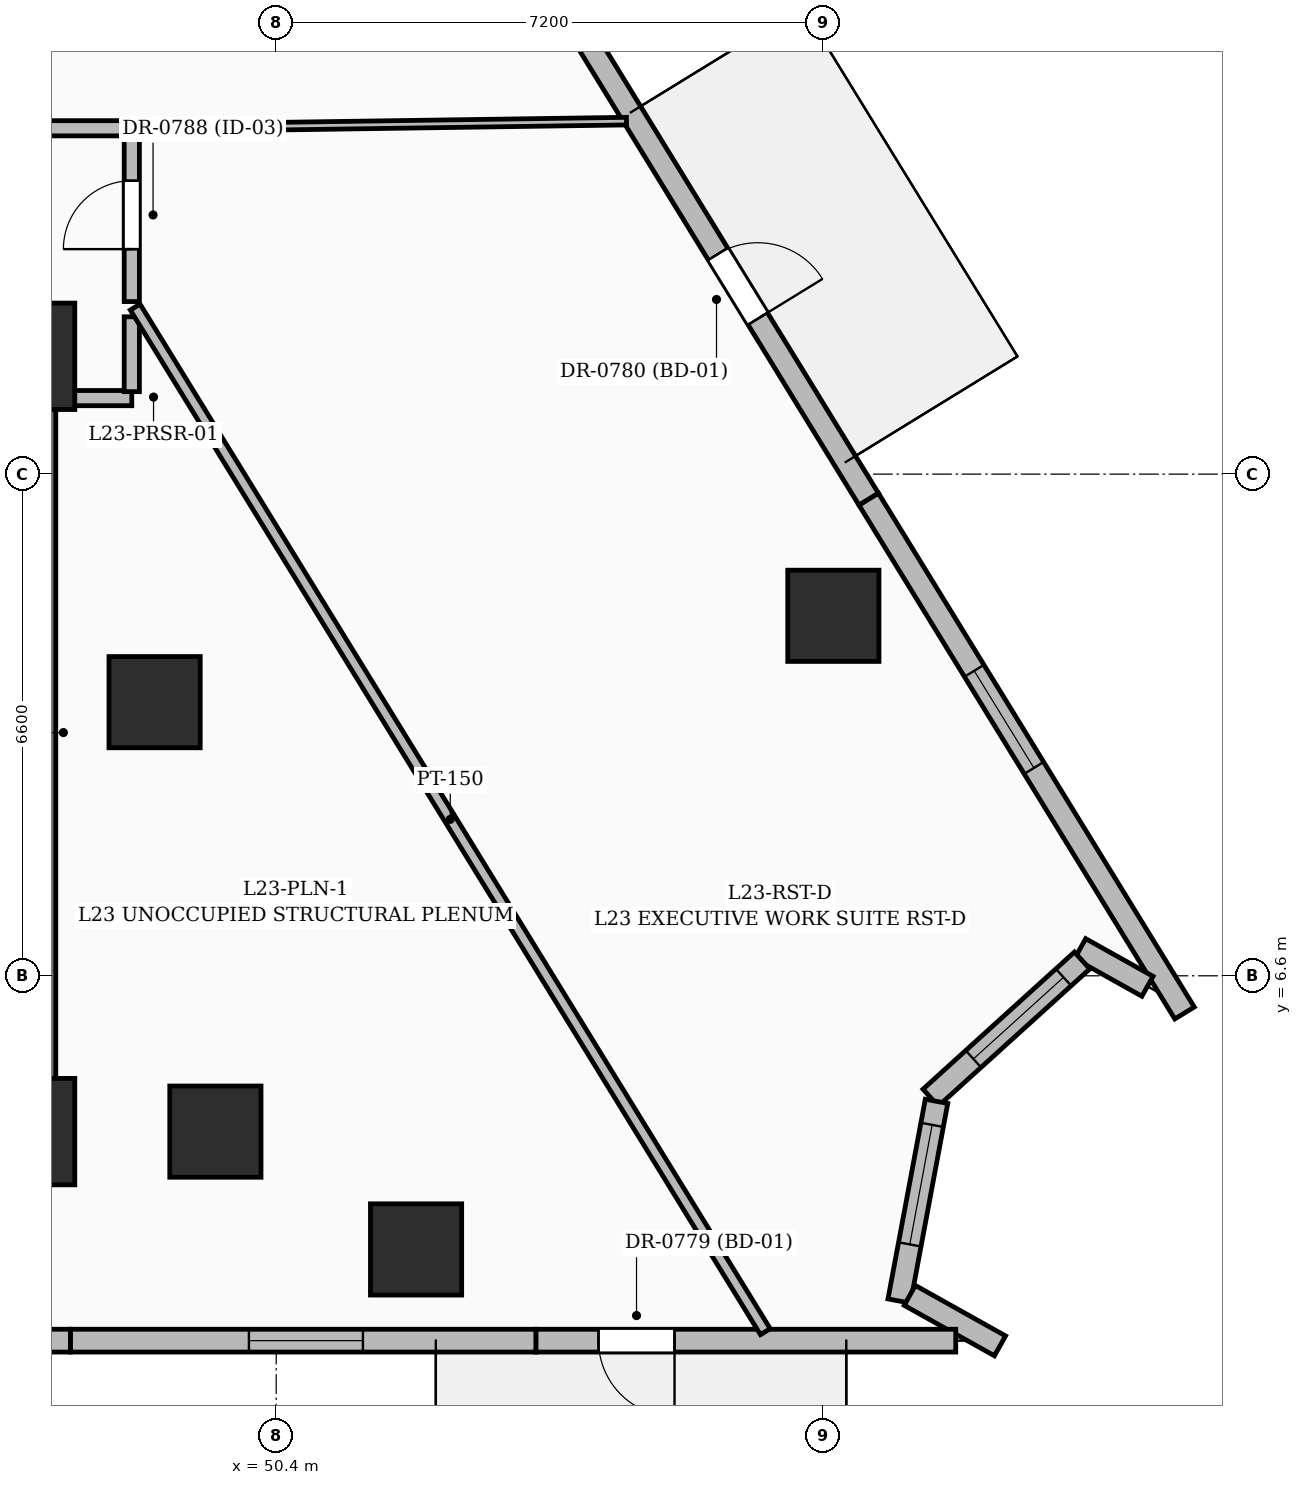
"""IFC4 building model, lengths in metres.
Left out: names, types, materials, properties, quantities, classifications, styles, units other than length and angle.
Written with IfcOpenShell. Run it as: python <this file> out.ifc"""

import sys

from ifc_helpers import new_model, si_unit, direction, frame, frame_2d, origin, origin_2d, place, context, subcontext, project, spatial, rectangle, extrude, element, fill, save


model = new_model("IFC4")
c1 = context("Model", 3, precision=1e-05, world=origin(), true_north=direction((0.0, 1.0)))
c2 = subcontext(c1, "Body", "Model", "MODEL_VIEW")
j1 = project(units=[si_unit("LENGTHUNIT", "METRE"), si_unit("PLANEANGLEUNIT", "RADIAN")], contexts=[c1])
p1 = place(None, origin())
s1 = spatial("IfcSite", under=j1, at=p1, CompositionType="ELEMENT")
p2 = place(p1, origin())
s2 = spatial("IfcBuilding", under=s1, at=p2, CompositionType="ELEMENT")
p3 = place(p2, frame((0.0, 0.0, 93.0)))
s3 = spatial("IfcBuildingStorey", under=s2, at=p3, CompositionType="ELEMENT", Elevation=93.0)
for number, where, z_axis, x_axis in (
    (1, (47.05, 4.55, 0.0), (0.0, 0.0, 1.0), (1.0, 0.0, 0.0)),
    (2, (47.05, 14.75, 0.0), (0.0, 0.0, 1.0), (1.0, 0.0, 0.0)),
):
    element("IfcColumn", number, at=place(p3, frame(where, z_axis=z_axis, x_axis=x_axis)), inside=s3, PredefinedType="COLUMN", context=c2, shape_type="SweptSolid", body=[
        extrude(rectangle(XDim=1.4, YDim=1.4, at=origin_2d()), origin(), (0.0, 0.0, 1.0), 3.6),
    ])
for number, where, z_axis, x_axis in (
    (3, (49.6, 4.55, 0.0), (0.0, 0.0, 1.0), (1.0, 0.0, 0.0)),
    (4, (48.8, 10.2, 0.0), (0.0, 0.0, 1.0), (1.0, 0.0, 0.0)),
):
    element("IfcColumn", number, at=place(p3, frame(where, z_axis=z_axis, x_axis=x_axis)), inside=s3, PredefinedType="COLUMN", context=c2, shape_type="SweptSolid", body=[
        extrude(rectangle(XDim=1.2, YDim=1.2, at=origin_2d()), origin(), (0.0, 0.0, 1.0), 3.6),
    ])
p4 = place(p3, frame((47.05, 5.25, 0.0), z_axis=(0.0, 0.0, 1.0), x_axis=(0.0, 1.0, 0.0)))
e5 = element("IfcWall", 5, at=p4, inside=s3, PredefinedType="SHEAR", context=c2, shape_type="SweptSolid", body=[
    extrude(rectangle(XDim=8.8, YDim=0.9, at=frame_2d((4.4, 0.0))), origin(), (0.0, 0.0, 1.0), 3.6),
])
for number, where, z_axis, x_axis in (
    (6, (52.24, 3.0, 0.0), (0.0, 0.0, 1.0), (1.0, 0.0, 0.0)),
    (7, (57.73, 11.336, 0.0), (0.0, 0.0, 1.0), (1.0, 0.0, 0.0)),
):
    element("IfcColumn", number, at=place(p3, frame(where, z_axis=z_axis, x_axis=x_axis)), inside=s3, PredefinedType="COLUMN", context=c2, shape_type="SweptSolid", body=[
        extrude(rectangle(XDim=1.2, YDim=1.2, at=origin_2d()), origin(), (0.0, 0.0, 1.0), 3.6),
    ])
p5 = place(p3, frame((54.041, 19.629, 0.0), z_axis=(0.0, 0.0, 1.0), x_axis=(0.523661280051, -0.851926560083, 0.0)))
e8 = element("IfcWall", 8, at=p5, inside=s3, PredefinedType="SOLIDWALL", context=c2, shape_type="SweptSolid", body=[
    extrude(rectangle(XDim=7.934, YDim=0.3, at=frame_2d((3.967, 0.0))), origin(), (0.0, 0.0, 1.0), 3.35),
])
p6 = place(p5, frame((4.146, 0.0, 0.0)))
e9 = element("IfcOpeningElement", 9, at=p6, cuts=e8, PredefinedType="OPENING", context=c2, shape_type="SweptSolid", body=[
    extrude(rectangle(XDim=1.0, YDim=2.2, at=frame_2d((0.5, 1.1))), frame((0.0, 0.16, 0.0), z_axis=(0.0, -1.0, 0.0), x_axis=(1.0, 0.0, 0.0)), (0.0, 0.0, 1.0), 0.32),
])
p7 = place(p3, frame((58.195, 12.87, 0.0), z_axis=(0.0, 0.0, 1.0), x_axis=(0.52368361247, -0.851912832413, 0.0)))
e10 = element("IfcWall", 10, at=p7, inside=s3, PredefinedType="SOLIDWALL", context=c2, shape_type="SweptSolid", body=[
    extrude(rectangle(XDim=7.934, YDim=0.3, at=frame_2d((3.967, 0.0))), origin(), (0.0, 0.0, 1.0), 3.35),
])
p8 = place(p7, frame((2.65, 0.0, 0.6)))
e11 = element("IfcOpeningElement", 11, at=p8, cuts=e10, PredefinedType="OPENING", context=c2, shape_type="SweptSolid", body=[
    extrude(rectangle(XDim=1.5, YDim=2.1, at=frame_2d((0.75, 1.05))), frame((0.0, 0.16, 0.0), z_axis=(0.0, -1.0, 0.0), x_axis=(1.0, 0.0, 0.0)), (0.0, 0.0, 1.0), 0.32),
])
p9 = place(p3, frame((61.863, 6.462, 0.0), z_axis=(0.0, 0.0, 1.0), x_axis=(-0.872678236231, 0.488295705499, 0.0)))
e12 = element("IfcWall", 12, at=p9, inside=s3, PredefinedType="SOLIDWALL", context=c2, shape_type="SweptSolid", body=[
    extrude(rectangle(XDim=1.015, YDim=0.3, at=frame_2d((0.507, 0.0))), origin(), (0.0, 0.0, 1.0), 3.35),
])
p10 = place(p3, frame((61.003, 6.802, 0.0), z_axis=(0.0, 0.0, 1.0), x_axis=(-0.741163448221, -0.671324618215, 0.0)))
e13 = element("IfcWall", 13, at=p10, inside=s3, PredefinedType="SOLIDWALL", context=c2, shape_type="SweptSolid", body=[
    extrude(rectangle(XDim=2.688, YDim=0.3, at=frame_2d((1.344, 0.0))), origin(), (0.0, 0.0, 1.0), 3.35),
])
p11 = place(p10, frame((0.33, 0.0, 0.55)))
e14 = element("IfcOpeningElement", 14, at=p11, cuts=e13, PredefinedType="OPENING", context=c2, shape_type="SweptSolid", body=[
    extrude(rectangle(XDim=1.6, YDim=2.2, at=frame_2d((0.8, 1.1))), frame((0.0, 0.16, 0.0), z_axis=(0.0, -1.0, 0.0), x_axis=(1.0, 0.0, 0.0)), (0.0, 0.0, 1.0), 0.32),
])
p12 = place(p3, frame((59.087, 4.948, 0.0), z_axis=(0.0, 0.0, 1.0), x_axis=(-0.183786629236, -0.982966161632, 0.0)))
e15 = element("IfcWall", 15, at=p12, inside=s3, PredefinedType="SOLIDWALL", context=c2, shape_type="SweptSolid", body=[
    extrude(rectangle(XDim=2.673, YDim=0.3, at=frame_2d((1.336, 0.0))), origin(), (0.0, 0.0, 1.0), 3.35),
])
p13 = place(p12, frame((0.315, 0.0, 0.55)))
e16 = element("IfcOpeningElement", 16, at=p13, cuts=e15, PredefinedType="OPENING", context=c2, shape_type="SweptSolid", body=[
    extrude(rectangle(XDim=1.6, YDim=2.2, at=frame_2d((0.8, 1.1))), frame((0.0, 0.16, 0.0), z_axis=(0.0, -1.0, 0.0), x_axis=(1.0, 0.0, 0.0)), (0.0, 0.0, 1.0), 0.32),
])
p14 = place(p3, frame((58.735, 2.396, 0.0), z_axis=(0.0, 0.0, 1.0), x_axis=(0.872747775204, -0.488171405221, 0.0)))
e17 = element("IfcWall", 17, at=p14, inside=s3, PredefinedType="SOLIDWALL", context=c2, shape_type="SweptSolid", body=[
    extrude(rectangle(XDim=1.36, YDim=0.3, at=frame_2d((0.68, 0.0))), origin(), (0.0, 0.0, 1.0), 3.35),
])
p15 = place(p3, frame((59.34, 1.8, 0.0), z_axis=(0.0, 0.0, 1.0), x_axis=(-1.0, 0.0, 0.0)))
e18 = element("IfcWall", 18, at=p15, inside=s3, PredefinedType="SOLIDWALL", context=c2, shape_type="SweptSolid", body=[
    extrude(rectangle(XDim=5.524, YDim=0.3, at=frame_2d((2.762, 0.0))), origin(), (0.0, 0.0, 1.0), 3.35),
])
p16 = place(p15, frame((3.7, 0.0, 0.0)))
e19 = element("IfcOpeningElement", 19, at=p16, cuts=e18, PredefinedType="OPENING", context=c2, shape_type="SweptSolid", body=[
    extrude(rectangle(XDim=1.0, YDim=2.2, at=frame_2d((0.5, 1.1))), frame((0.0, 0.16, 0.0), z_axis=(0.0, -1.0, 0.0), x_axis=(1.0, 0.0, 0.0)), (0.0, 0.0, 1.0), 0.32),
])
p17 = place(p3, frame((53.816, 1.8, 0.0), z_axis=(0.0, 0.0, 1.0), x_axis=(-1.0, 0.0, 0.0)))
e20 = element("IfcWall", 20, at=p17, inside=s3, PredefinedType="SOLIDWALL", context=c2, shape_type="SweptSolid", body=[
    extrude(rectangle(XDim=6.124, YDim=0.3, at=frame_2d((3.062, 0.0))), origin(), (0.0, 0.0, 1.0), 3.35),
])
p18 = place(p17, frame((2.275, 0.0, 0.6)))
e21 = element("IfcOpeningElement", 21, at=p18, cuts=e20, PredefinedType="OPENING", context=c2, shape_type="SweptSolid", body=[
    extrude(rectangle(XDim=1.5, YDim=2.1, at=frame_2d((0.75, 1.05))), frame((0.0, 0.16, 0.0), z_axis=(0.0, -1.0, 0.0), x_axis=(1.0, 0.0, 0.0)), (0.0, 0.0, 1.0), 0.32),
])
p19 = place(p3, frame((47.692, 1.8, 0.0), z_axis=(0.0, 0.0, 1.0), x_axis=(-1.0, 0.0, 0.0)))
e22 = element("IfcWall", 22, at=p19, inside=s3, PredefinedType="SOLIDWALL", context=c2, shape_type="SweptSolid", body=[
    extrude(rectangle(XDim=6.124, YDim=0.3, at=frame_2d((3.062, 0.0))), origin(), (0.0, 0.0, 1.0), 3.35),
])
p20 = place(p19, frame((2.425, 0.0, 0.8)))
e23 = element("IfcOpeningElement", 23, at=p20, cuts=e22, PredefinedType="OPENING", context=c2, shape_type="SweptSolid", body=[
    extrude(rectangle(XDim=1.2, YDim=1.8, at=frame_2d((0.6, 0.9))), frame((0.0, 0.16, 0.0), z_axis=(0.0, -1.0, 0.0), x_axis=(1.0, 0.0, 0.0)), (0.0, 0.0, 1.0), 0.32),
])
p21 = place(p3, frame((47.5, 14.2, 0.0), z_axis=(0.0, 0.0, 1.0), x_axis=(1.0, 0.0, 0.0)))
e24 = element("IfcWall", 24, at=p21, inside=s3, PredefinedType="PARTITIONING", context=c2, shape_type="SweptSolid", body=[
    extrude(rectangle(XDim=1.0, YDim=0.2, at=frame_2d((0.5, 0.0))), origin(), (0.0, 0.0, 1.0), 3.35),
])
p22 = place(p3, frame((48.5, 14.285, 0.0), z_axis=(0.0, 0.0, 1.0), x_axis=(0.0, 1.0, 0.0)))
e25 = element("IfcWall", 25, at=p22, inside=s3, PredefinedType="PARTITIONING", context=c2, shape_type="SweptSolid", body=[
    extrude(rectangle(XDim=0.985, YDim=0.2, at=frame_2d((0.493, 0.0))), origin(), (0.0, 0.0, 1.0), 3.35),
])
p23 = place(p3, frame((48.5, 15.47, 0.0), z_axis=(0.0, 0.0, 1.0), x_axis=(0.0, 1.0, 0.0)))
e26 = element("IfcWall", 26, at=p23, inside=s3, PredefinedType="PARTITIONING", context=c2, shape_type="SweptSolid", body=[
    extrude(rectangle(XDim=2.28, YDim=0.2, at=frame_2d((1.14, 0.0))), origin(), (0.0, 0.0, 1.0), 2.345),
])
p24 = place(p23, frame((0.69, 0.0, 0.0)))
e27 = element("IfcOpeningElement", 27, at=p24, cuts=e26, PredefinedType="OPENING", context=c2, shape_type="SweptSolid", body=[
    extrude(rectangle(XDim=0.9, YDim=2.1, at=frame_2d((0.45, 1.05))), frame((0.0, 0.11, 0.0), z_axis=(0.0, -1.0, 0.0), x_axis=(1.0, 0.0, 0.0)), (0.0, 0.0, 1.0), 0.22),
])
p25 = place(p3, frame((48.415, 17.75, 0.0), z_axis=(0.0, 0.0, 1.0), x_axis=(-1.0, 0.0, 0.0)))
e28 = element("IfcWall", 28, at=p25, inside=s3, PredefinedType="PARTITIONING", context=c2, shape_type="SweptSolid", body=[
    extrude(rectangle(XDim=3.455, YDim=0.2, at=frame_2d((1.728, 0.0))), origin(), (0.0, 0.0, 1.0), 2.309),
])
p26 = place(p25, frame((1.235, 0.0, 0.0)))
e29 = element("IfcOpeningElement", 29, at=p26, cuts=e28, PredefinedType="OPENING", context=c2, shape_type="SweptSolid", body=[
    extrude(rectangle(XDim=0.9, YDim=2.1, at=frame_2d((0.45, 1.05))), frame((0.0, 0.11, 0.0), z_axis=(0.0, -1.0, 0.0), x_axis=(1.0, 0.0, 0.0)), (0.0, 0.0, 1.0), 0.22),
])
p27 = place(p3, frame((56.835, 1.918, 0.0), z_axis=(0.0, 0.0, 1.0), x_axis=(-0.52387102705, 0.851797597447, 0.0)))
e30 = element("IfcWall", 30, at=p27, inside=s3, PredefinedType="PARTITIONING", context=c2, shape_type="SweptSolid", body=[
    extrude(rectangle(XDim=15.825, YDim=0.15, at=frame_2d((7.913, 0.0))), origin(), (0.0, 0.0, 1.0), 2.345),
])
p28 = place(p3, frame((55.008, 17.844, 0.0), z_axis=(0.0, 0.0, 1.0), x_axis=(-0.999895156148, -0.014480217967, 0.0)))
e31 = element("IfcWall", 31, at=p28, inside=s3, PredefinedType="PARTITIONING", context=c2, shape_type="SweptSolid", body=[
    extrude(rectangle(XDim=6.424, YDim=0.1, at=frame_2d((3.212, 0.0))), origin(), (0.0, 0.0, 1.0), 2.345),
])
p29 = place(p6, origin())
e32 = element("IfcDoor", 32, at=p29, inside=s3, OperationType="SINGLE_SWING_RIGHT", PredefinedType="DOOR", context=c2, shape_type="SweptSolid", body=[
    extrude(rectangle(XDim=1.0, YDim=2.2, at=frame_2d((0.5, 1.1))), frame((0.0, 0.025, 0.0), z_axis=(0.0, -1.0, 0.0), x_axis=(1.0, 0.0, 0.0)), (0.0, 0.0, 1.0), 0.05),
])
fill(e9, e32)
p30 = place(p8, origin())
e33 = element("IfcWindow", 33, at=p30, inside=s3, PartitioningType="SINGLE_PANEL", PredefinedType="WINDOW", context=c2, shape_type="SweptSolid", body=[
    extrude(rectangle(XDim=1.5, YDim=2.1, at=frame_2d((0.75, 1.05))), frame((0.0, 0.03, 0.0), z_axis=(0.0, -1.0, 0.0), x_axis=(1.0, 0.0, 0.0)), (0.0, 0.0, 1.0), 0.06),
])
fill(e11, e33)
p31 = place(p11, origin())
e34 = element("IfcWindow", 34, at=p31, inside=s3, PartitioningType="SINGLE_PANEL", PredefinedType="WINDOW", context=c2, shape_type="SweptSolid", body=[
    extrude(rectangle(XDim=1.6, YDim=2.2, at=frame_2d((0.8, 1.1))), frame((0.0, 0.03, 0.0), z_axis=(0.0, -1.0, 0.0), x_axis=(1.0, 0.0, 0.0)), (0.0, 0.0, 1.0), 0.06),
])
fill(e14, e34)
p32 = place(p13, origin())
e35 = element("IfcWindow", 35, at=p32, inside=s3, PartitioningType="SINGLE_PANEL", PredefinedType="WINDOW", context=c2, shape_type="SweptSolid", body=[
    extrude(rectangle(XDim=1.6, YDim=2.2, at=frame_2d((0.8, 1.1))), frame((0.0, 0.03, 0.0), z_axis=(0.0, -1.0, 0.0), x_axis=(1.0, 0.0, 0.0)), (0.0, 0.0, 1.0), 0.06),
])
fill(e16, e35)
p33 = place(p16, origin())
e36 = element("IfcDoor", 36, at=p33, inside=s3, OperationType="SINGLE_SWING_LEFT", PredefinedType="DOOR", context=c2, shape_type="SweptSolid", body=[
    extrude(rectangle(XDim=1.0, YDim=2.2, at=frame_2d((0.5, 1.1))), frame((0.0, 0.025, 0.0), z_axis=(0.0, -1.0, 0.0), x_axis=(1.0, 0.0, 0.0)), (0.0, 0.0, 1.0), 0.05),
])
fill(e19, e36)
p34 = place(p18, origin())
e37 = element("IfcWindow", 37, at=p34, inside=s3, PartitioningType="SINGLE_PANEL", PredefinedType="WINDOW", context=c2, shape_type="SweptSolid", body=[
    extrude(rectangle(XDim=1.5, YDim=2.1, at=frame_2d((0.75, 1.05))), frame((0.0, 0.03, 0.0), z_axis=(0.0, -1.0, 0.0), x_axis=(1.0, 0.0, 0.0)), (0.0, 0.0, 1.0), 0.06),
])
fill(e21, e37)
p35 = place(p24, origin())
e38 = element("IfcDoor", 38, at=p35, inside=s3, OperationType="SINGLE_SWING_LEFT", PredefinedType="DOOR", context=c2, shape_type="SweptSolid", body=[
    extrude(rectangle(XDim=0.9, YDim=2.1, at=frame_2d((0.45, 1.05))), frame((0.0, 0.025, 0.0), z_axis=(0.0, -1.0, 0.0), x_axis=(1.0, 0.0, 0.0)), (0.0, 0.0, 1.0), 0.05),
])
fill(e27, e38)
save(model, sys.argv[1])
